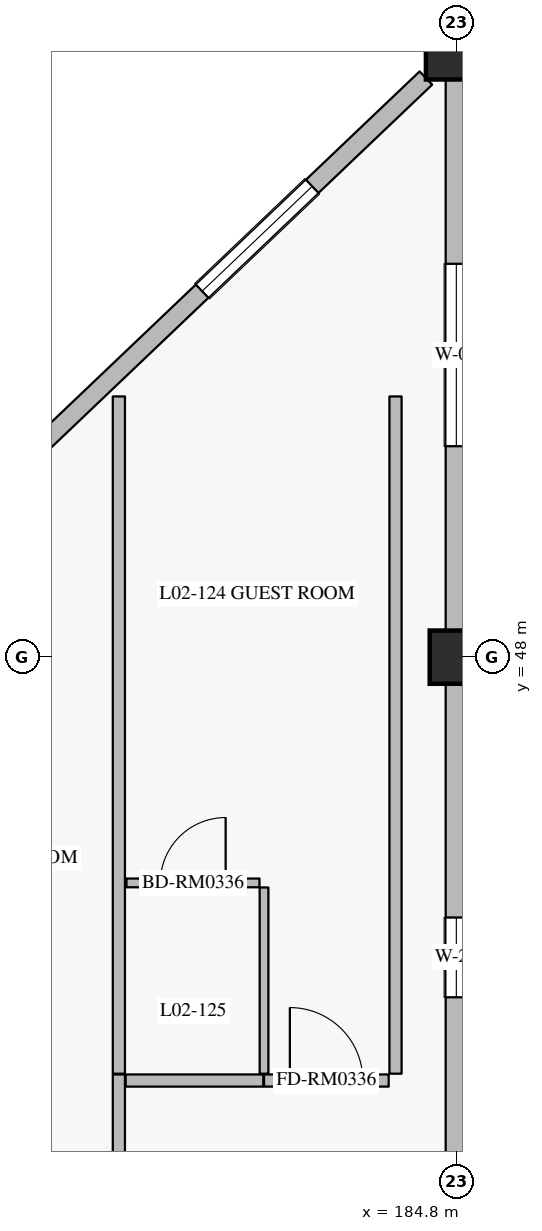
"""IFC4 building model, lengths in metres.
Left out: names, types, materials, properties, quantities, classifications, styles, units other than length and angle.
Written with IfcOpenShell. Run it as: python <this file> out.ifc"""

import sys

from ifc_helpers import new_model, si_unit, direction, frame, frame_2d, origin, origin_2d, place, context, subcontext, project, spatial, rectangle, extrude, element, fill, save


model = new_model("IFC4")
c1 = context("Model", 3, precision=1e-05, world=origin(), true_north=direction((0.0, 1.0)))
c2 = subcontext(c1, "Body", "Model", "MODEL_VIEW")
j1 = project(units=[si_unit("LENGTHUNIT", "METRE"), si_unit("PLANEANGLEUNIT", "RADIAN")], contexts=[c1])
p1 = place(None, origin())
s1 = spatial("IfcSite", under=j1, at=p1, CompositionType="ELEMENT")
p2 = place(p1, origin())
s2 = spatial("IfcBuilding", under=s1, at=p2, CompositionType="ELEMENT")
p3 = place(p2, frame((0.0, 0.0, 11.4)))
s3 = spatial("IfcBuildingStorey", under=s2, at=p3, CompositionType="ELEMENT", Elevation=11.4)
p4 = place(p3, frame((184.8, 56.0, 0.0), z_axis=(0.0, 0.0, 1.0), x_axis=(1.0, 0.0, 0.0)))
e1 = element("IfcColumn", 1, at=p4, inside=s3, PredefinedType="COLUMN", context=c2, shape_type="SweptSolid", body=[
    extrude(rectangle(XDim=0.8, YDim=0.8, at=origin_2d()), origin(), (0.0, 0.0, 1.0), 4.8),
])
p5 = place(p3, frame((184.8, 48.0, 0.0), z_axis=(0.0, 0.0, 1.0), x_axis=(1.0, 0.0, 0.0)))
e2 = element("IfcColumn", 2, at=p5, inside=s3, PredefinedType="COLUMN", context=c2, shape_type="SweptSolid", body=[
    extrude(rectangle(XDim=0.7, YDim=0.7, at=origin_2d()), origin(), (0.0, 0.0, 1.0), 4.8),
])
p6 = place(p3, frame((176.8, 48.381, 0.0), z_axis=(0.0, 0.0, 1.0), x_axis=(0.724145676014, 0.689647040094, 0.0)))
e3 = element("IfcWall", 3, at=p6, inside=s3, PredefinedType="SOLIDWALL", context=c2, shape_type="SweptSolid", body=[
    extrude(rectangle(XDim=10.495, YDim=0.24, at=frame_2d((5.248, 0.0))), origin(), (0.0, 0.0, 1.0), 4.13),
])
p7 = place(p6, frame((1.396, 0.0, 0.8)))
e4 = element("IfcOpeningElement", 4, at=p7, cuts=e3, PredefinedType="OPENING", context=c2, shape_type="SweptSolid", body=[
    extrude(rectangle(XDim=2.0, YDim=1.75, at=frame_2d((1.0, 0.875))), frame((0.0, 0.13, 0.0), z_axis=(0.0, -1.0, 0.0), x_axis=(1.0, 0.0, 0.0)), (0.0, 0.0, 1.0), 0.26),
])
p8 = place(p6, frame((6.429, 0.0, 0.8)))
e5 = element("IfcOpeningElement", 5, at=p8, cuts=e3, PredefinedType="OPENING", context=c2, shape_type="SweptSolid", body=[
    extrude(rectangle(XDim=2.0, YDim=1.75, at=frame_2d((1.0, 0.875))), frame((0.0, 0.13, 0.0), z_axis=(0.0, -1.0, 0.0), x_axis=(1.0, 0.0, 0.0)), (0.0, 0.0, 1.0), 0.26),
])
p9 = place(p3, frame((184.8, 55.6, 0.0), z_axis=(0.0, 0.0, 1.0), x_axis=(0.0, -1.0, 0.0)))
e6 = element("IfcWall", 6, at=p9, inside=s3, PredefinedType="SOLIDWALL", context=c2, shape_type="SweptSolid", body=[
    extrude(rectangle(XDim=7.25, YDim=0.28, at=frame_2d((3.625, 0.0))), origin(), (0.0, 0.0, 1.0), 3.9),
])
p10 = place(p9, frame((2.425, 0.0, 0.75)))
e7 = element("IfcOpeningElement", 7, at=p10, cuts=e6, PredefinedType="OPENING", context=c2, shape_type="SweptSolid", body=[
    extrude(rectangle(XDim=2.4, YDim=1.65, at=frame_2d((1.2, 0.825))), frame((0.0, 0.15, 0.0), z_axis=(0.0, -1.0, 0.0), x_axis=(1.0, 0.0, 0.0)), (0.0, 0.0, 1.0), 0.3),
])
p11 = place(p3, frame((184.8, 47.65, 0.0), z_axis=(0.0, 0.0, 1.0), x_axis=(0.0, -1.0, 0.0)))
e8 = element("IfcWall", 8, at=p11, inside=s3, PredefinedType="SOLIDWALL", context=c2, shape_type="SweptSolid", body=[
    extrude(rectangle(XDim=7.2, YDim=0.28, at=frame_2d((3.6, 0.0))), origin(), (0.0, 0.0, 1.0), 3.9),
])
p12 = place(p11, frame((3.075, 0.0, 0.75)))
e9 = element("IfcOpeningElement", 9, at=p12, cuts=e8, PredefinedType="OPENING", context=c2, shape_type="SweptSolid", body=[
    extrude(rectangle(XDim=1.05, YDim=1.65, at=frame_2d((0.525, 0.825))), frame((0.0, 0.15, 0.0), z_axis=(0.0, -1.0, 0.0), x_axis=(1.0, 0.0, 0.0)), (0.0, 0.0, 1.0), 0.3),
])
p13 = place(p3, frame((180.36, 39.05, 0.0), z_axis=(0.0, 0.0, 1.0), x_axis=(0.0, 1.0, 0.0)))
e10 = element("IfcWall", 10, at=p13, inside=s3, PredefinedType="PARTITIONING", context=c2, shape_type="SweptSolid", body=[
    extrude(rectangle(XDim=3.46, YDim=0.16, at=frame_2d((1.73, 0.0))), origin(), (0.0, 0.0, 1.0), 4.535),
])
p14 = place(p3, frame((180.45, 42.43, 0.0), z_axis=(0.0, 0.0, 1.0), x_axis=(1.0, 0.0, 0.0)))
e11 = element("IfcWall", 11, at=p14, inside=s3, PredefinedType="PARTITIONING", context=c2, shape_type="SweptSolid", body=[
    extrude(rectangle(XDim=1.81, YDim=0.16, at=frame_2d((0.905, 0.0))), origin(), (0.0, 0.0, 1.0), 4.535),
])
p15 = place(p3, frame((182.27, 42.43, 0.0), z_axis=(0.0, 0.0, 1.0), x_axis=(1.0, 0.0, 0.0)))
e12 = element("IfcWall", 12, at=p15, inside=s3, PredefinedType="PARTITIONING", context=c2, shape_type="SweptSolid", body=[
    extrude(rectangle(XDim=1.64, YDim=0.16, at=frame_2d((0.82, 0.0))), origin(), (0.0, 0.0, 1.0), 4.535),
])
p16 = place(p15, frame((0.34, 0.0, 0.0)))
e13 = element("IfcOpeningElement", 13, at=p16, cuts=e12, PredefinedType="OPENING", context=c2, shape_type="SweptSolid", body=[
    extrude(rectangle(XDim=0.96, YDim=2.2, at=frame_2d((0.48, 1.1))), frame((0.0, 0.09, 0.0), z_axis=(0.0, -1.0, 0.0), x_axis=(1.0, 0.0, 0.0)), (0.0, 0.0, 1.0), 0.18),
])
p17 = place(p3, frame((182.27, 42.52, 0.0), z_axis=(0.0, 0.0, 1.0), x_axis=(0.0, 1.0, 0.0)))
e14 = element("IfcWall", 14, at=p17, inside=s3, PredefinedType="PARTITIONING", context=c2, shape_type="SweptSolid", body=[
    extrude(rectangle(XDim=2.45, YDim=0.115, at=frame_2d((1.225, 0.0))), origin(), (0.0, 0.0, 1.0), 4.535),
])
p18 = place(p3, frame((180.46, 45.03, 0.0), z_axis=(0.0, 0.0, 1.0), x_axis=(1.0, 0.0, 0.0)))
e15 = element("IfcWall", 15, at=p18, inside=s3, PredefinedType="PARTITIONING", context=c2, shape_type="SweptSolid", body=[
    extrude(rectangle(XDim=1.75, YDim=0.115, at=frame_2d((0.875, 0.0))), origin(), (0.0, 0.0, 1.0), 4.535),
])
p19 = place(p18, frame((0.445, 0.0, 0.0)))
e16 = element("IfcOpeningElement", 16, at=p19, cuts=e15, PredefinedType="OPENING", context=c2, shape_type="SweptSolid", body=[
    extrude(rectangle(XDim=0.86, YDim=2.12, at=frame_2d((0.43, 1.06))), frame((0.0, 0.067, 0.0), z_axis=(0.0, -1.0, 0.0), x_axis=(1.0, 0.0, 0.0)), (0.0, 0.0, 1.0), 0.135),
])
for number, where, z_axis, x_axis in (
    (17, (180.36, 42.52, 0.0), (0.0, 0.0, 1.0), (0.0, 1.0, 0.0)),
    (18, (184.0, 42.52, 0.0), (0.0, 0.0, 1.0), (0.0, 1.0, 0.0)),
):
    element("IfcWall", number, at=place(p3, frame(where, z_axis=z_axis, x_axis=x_axis)), inside=s3, PredefinedType="PARTITIONING", context=c2, shape_type="SweptSolid", body=[
        extrude(rectangle(XDim=8.91, YDim=0.16, at=frame_2d((4.455, 0.0))), origin(), (0.0, 0.0, 1.0), 4.535),
    ])
p20 = place(p8, origin())
e19 = element("IfcWindow", 19, at=p20, inside=s3, PartitioningType="DOUBLE_PANEL_VERTICAL", PredefinedType="WINDOW", context=c2, shape_type="SweptSolid", body=[
    extrude(rectangle(XDim=2.0, YDim=1.75, at=frame_2d((1.0, 0.875))), frame((0.0, 0.03, 0.0), z_axis=(0.0, -1.0, 0.0), x_axis=(1.0, 0.0, 0.0)), (0.0, 0.0, 1.0), 0.06),
])
fill(e5, e19)
p21 = place(p10, origin())
e20 = element("IfcWindow", 20, at=p21, inside=s3, PartitioningType="DOUBLE_PANEL_VERTICAL", PredefinedType="WINDOW", context=c2, shape_type="SweptSolid", body=[
    extrude(rectangle(XDim=2.4, YDim=1.65, at=frame_2d((1.2, 0.825))), frame((0.0, 0.03, 0.0), z_axis=(0.0, -1.0, 0.0), x_axis=(1.0, 0.0, 0.0)), (0.0, 0.0, 1.0), 0.06),
])
fill(e7, e20)
p22 = place(p12, origin())
e21 = element("IfcWindow", 21, at=p22, inside=s3, PartitioningType="SINGLE_PANEL", PredefinedType="WINDOW", context=c2, shape_type="SweptSolid", body=[
    extrude(rectangle(XDim=1.05, YDim=1.65, at=frame_2d((0.525, 0.825))), frame((0.0, 0.03, 0.0), z_axis=(0.0, -1.0, 0.0), x_axis=(1.0, 0.0, 0.0)), (0.0, 0.0, 1.0), 0.06),
])
fill(e9, e21)
p23 = place(p16, origin())
e22 = element("IfcDoor", 22, at=p23, inside=s3, OperationType="SINGLE_SWING_LEFT", PredefinedType="DOOR", context=c2, shape_type="SweptSolid", body=[
    extrude(rectangle(XDim=0.96, YDim=2.2, at=frame_2d((0.48, 1.1))), frame((0.0, 0.025, 0.0), z_axis=(0.0, -1.0, 0.0), x_axis=(1.0, 0.0, 0.0)), (0.0, 0.0, 1.0), 0.05),
])
fill(e13, e22)
p24 = place(p19, origin())
e23 = element("IfcDoor", 23, at=p24, inside=s3, OperationType="SINGLE_SWING_RIGHT", PredefinedType="DOOR", context=c2, shape_type="SweptSolid", body=[
    extrude(rectangle(XDim=0.86, YDim=2.12, at=frame_2d((0.43, 1.06))), frame((0.0, 0.025, 0.0), z_axis=(0.0, -1.0, 0.0), x_axis=(1.0, 0.0, 0.0)), (0.0, 0.0, 1.0), 0.05),
])
fill(e16, e23)
save(model, sys.argv[1])
